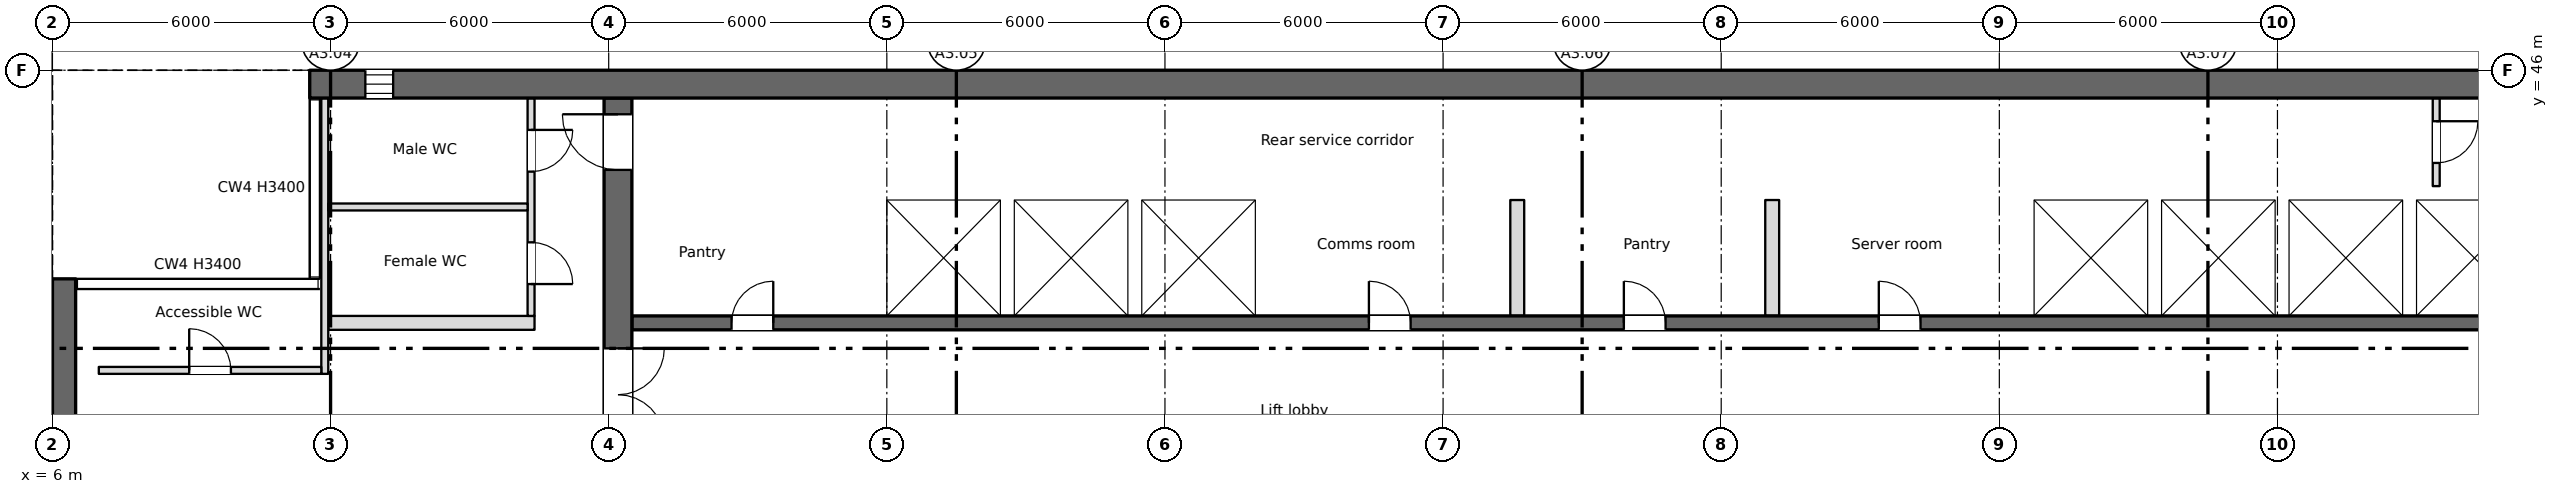
"""IFC4 building model, lengths in metres.
Left out: names, types, materials, properties, quantities, classifications, styles, units other than length and angle.
Written with IfcOpenShell. Run it as: python <this file> out.ifc"""

import sys

from ifc_helpers import new_model, si_unit, direction, frame, frame_2d, origin, place, context, subcontext, project, spatial, rectangle, extrude, element, fill, save


model = new_model("IFC4")
c1 = context("Model", 3, precision=1e-05, world=origin(), true_north=direction((0.0, 1.0)))
c2 = subcontext(c1, "Body", "Model", "MODEL_VIEW")
j1 = project(units=[si_unit("LENGTHUNIT", "METRE"), si_unit("PLANEANGLEUNIT", "RADIAN")], contexts=[c1])
p1 = place(None, origin())
s1 = spatial("IfcSite", under=j1, at=p1, CompositionType="ELEMENT")
p2 = place(p1, origin())
s2 = spatial("IfcBuilding", under=s1, at=p2, CompositionType="ELEMENT")
p3 = place(p2, frame((0.0, 0.0, 239.35)))
s3 = spatial("IfcBuildingStorey", under=s2, at=p3, CompositionType="ELEMENT", Elevation=239.35)
p4 = place(p3, frame((6.25, 8.5, 0.0), z_axis=(0.0, 0.0, 1.0), x_axis=(0.0, 1.0, 0.0)))
e1 = element("IfcWall", 1, at=p4, inside=s3, PredefinedType="SHEAR", context=c2, shape_type="SweptSolid", body=[
    extrude(rectangle(XDim=33.0, YDim=0.5, at=frame_2d((16.5, 0.0))), origin(), (0.0, 0.0, 1.0), 3.4),
])
p5 = place(p4, frame((1.6, 0.0, 0.6)))
e2 = element("IfcOpeningElement", 2, at=p5, cuts=e1, PredefinedType="OPENING", context=c2, shape_type="SweptSolid", body=[
    extrude(rectangle(XDim=0.6, YDim=2.4, at=frame_2d((0.3, 1.2))), frame((0.0, 0.26, 0.0), z_axis=(0.0, -1.0, 0.0), x_axis=(1.0, 0.0, 0.0)), (0.0, 0.0, 1.0), 0.52),
])
p6 = place(p4, frame((7.55, 0.0, 0.6)))
e3 = element("IfcOpeningElement", 3, at=p6, cuts=e1, PredefinedType="OPENING", context=c2, shape_type="SweptSolid", body=[
    extrude(rectangle(XDim=0.6, YDim=2.4, at=frame_2d((0.3, 1.2))), frame((0.0, 0.26, 0.0), z_axis=(0.0, -1.0, 0.0), x_axis=(1.0, 0.0, 0.0)), (0.0, 0.0, 1.0), 0.52),
])
p7 = place(p4, frame((13.2, 0.0, 0.6)))
e4 = element("IfcOpeningElement", 4, at=p7, cuts=e1, PredefinedType="OPENING", context=c2, shape_type="SweptSolid", body=[
    extrude(rectangle(XDim=0.6, YDim=2.4, at=frame_2d((0.3, 1.2))), frame((0.0, 0.26, 0.0), z_axis=(0.0, -1.0, 0.0), x_axis=(1.0, 0.0, 0.0)), (0.0, 0.0, 1.0), 0.52),
])
p8 = place(p3, frame((11.55, 45.7, 0.0), z_axis=(0.0, 0.0, 1.0), x_axis=(1.0, 0.0, 0.0)))
e5 = element("IfcWall", 5, at=p8, inside=s3, PredefinedType="SHEAR", context=c2, shape_type="SweptSolid", body=[
    extrude(rectangle(XDim=48.9, YDim=0.6, at=frame_2d((24.45, 0.0))), origin(), (0.0, 0.0, 1.0), 3.4),
])
p9 = place(p8, frame((1.2, 0.0, 0.6)))
e6 = element("IfcOpeningElement", 6, at=p9, cuts=e5, PredefinedType="OPENING", context=c2, shape_type="SweptSolid", body=[
    extrude(rectangle(XDim=0.6, YDim=2.4, at=frame_2d((0.3, 1.2))), frame((0.0, 0.31, 0.0), z_axis=(0.0, -1.0, 0.0), x_axis=(1.0, 0.0, 0.0)), (0.0, 0.0, 1.0), 0.62),
])
p10 = place(p3, frame((6.75, 28.4, 0.0), z_axis=(0.0, 0.0, 1.0), x_axis=(0.0, 1.0, 0.0)))
e7 = element("IfcWall", 7, at=p10, inside=s3, PredefinedType="SHEAR", context=c2, shape_type="SweptSolid", body=[
    extrude(rectangle(XDim=12.85, YDim=0.5, at=frame_2d((6.425, 0.0))), origin(), (0.0, 0.0, 1.0), 3.4),
])
p11 = place(p3, frame((18.2, 28.4, 0.0), z_axis=(0.0, 0.0, 1.0), x_axis=(0.0, 1.0, 0.0)))
e8 = element("IfcWall", 8, at=p11, inside=s3, PredefinedType="SHEAR", context=c2, shape_type="SweptSolid", body=[
    extrude(rectangle(XDim=17.0, YDim=0.6, at=frame_2d((8.5, 0.0))), origin(), (0.0, 0.0, 1.0), 3.4),
])
p12 = place(p11, frame((9.6, 0.0, 0.0)))
e9 = element("IfcOpeningElement", 9, at=p12, cuts=e8, PredefinedType="OPENING", context=c2, shape_type="SweptSolid", body=[
    extrude(rectangle(XDim=2.0, YDim=2.1, at=frame_2d((1.0, 1.05))), frame((0.0, 0.31, 0.0), z_axis=(0.0, -1.0, 0.0), x_axis=(1.0, 0.0, 0.0)), (0.0, 0.0, 1.0), 0.62),
])
p13 = place(p11, frame((15.45, 0.0, 0.0)))
e10 = element("IfcOpeningElement", 10, at=p13, cuts=e8, PredefinedType="OPENING", context=c2, shape_type="SweptSolid", body=[
    extrude(rectangle(XDim=1.2, YDim=2.1, at=frame_2d((0.6, 1.05))), frame((0.0, 0.31, 0.0), z_axis=(0.0, -1.0, 0.0), x_axis=(1.0, 0.0, 0.0)), (0.0, 0.0, 1.0), 0.62),
])
p14 = place(p3, frame((18.5, 40.55, 0.0), z_axis=(0.0, 0.0, 1.0), x_axis=(1.0, 0.0, 0.0)))
e11 = element("IfcWall", 11, at=p14, inside=s3, PredefinedType="SHEAR", context=c2, shape_type="SweptSolid", body=[
    extrude(rectangle(XDim=41.0, YDim=0.3, at=frame_2d((20.5, 0.0))), origin(), (0.0, 0.0, 1.0), 3.4),
])
p15 = place(p14, frame((2.15, 0.0, 0.0)))
e12 = element("IfcOpeningElement", 12, at=p15, cuts=e11, PredefinedType="OPENING", context=c2, shape_type="SweptSolid", body=[
    extrude(rectangle(XDim=0.9, YDim=2.1, at=frame_2d((0.45, 1.05))), frame((0.0, 0.16, 0.0), z_axis=(0.0, -1.0, 0.0), x_axis=(1.0, 0.0, 0.0)), (0.0, 0.0, 1.0), 0.32),
])
p16 = place(p14, frame((15.9, 0.0, 0.0)))
e13 = element("IfcOpeningElement", 13, at=p16, cuts=e11, PredefinedType="OPENING", context=c2, shape_type="SweptSolid", body=[
    extrude(rectangle(XDim=0.9, YDim=2.1, at=frame_2d((0.45, 1.05))), frame((0.0, 0.16, 0.0), z_axis=(0.0, -1.0, 0.0), x_axis=(1.0, 0.0, 0.0)), (0.0, 0.0, 1.0), 0.32),
])
p17 = place(p14, frame((21.4, 0.0, 0.0)))
e14 = element("IfcOpeningElement", 14, at=p17, cuts=e11, PredefinedType="OPENING", context=c2, shape_type="SweptSolid", body=[
    extrude(rectangle(XDim=0.9, YDim=2.1, at=frame_2d((0.45, 1.05))), frame((0.0, 0.16, 0.0), z_axis=(0.0, -1.0, 0.0), x_axis=(1.0, 0.0, 0.0)), (0.0, 0.0, 1.0), 0.32),
])
p18 = place(p14, frame((26.9, 0.0, 0.0)))
e15 = element("IfcOpeningElement", 15, at=p18, cuts=e11, PredefinedType="OPENING", context=c2, shape_type="SweptSolid", body=[
    extrude(rectangle(XDim=0.9, YDim=2.1, at=frame_2d((0.45, 1.05))), frame((0.0, 0.16, 0.0), z_axis=(0.0, -1.0, 0.0), x_axis=(1.0, 0.0, 0.0)), (0.0, 0.0, 1.0), 0.32),
])
p19 = place(p14, frame((6.175, 0.0, 0.0)))
e16 = element("IfcOpeningElement", 16, at=p19, cuts=e11, PredefinedType="OPENING", context=c2, shape_type="SweptSolid", body=[
    extrude(rectangle(XDim=1.1, YDim=2.1, at=frame_2d((0.55, 1.05))), frame((0.0, 0.16, 0.0), z_axis=(0.0, -1.0, 0.0), x_axis=(1.0, 0.0, 0.0)), (0.0, 0.0, 1.0), 0.32),
])
p20 = place(p14, frame((8.925, 0.0, 0.0)))
e17 = element("IfcOpeningElement", 17, at=p20, cuts=e11, PredefinedType="OPENING", context=c2, shape_type="SweptSolid", body=[
    extrude(rectangle(XDim=1.1, YDim=2.1, at=frame_2d((0.55, 1.05))), frame((0.0, 0.16, 0.0), z_axis=(0.0, -1.0, 0.0), x_axis=(1.0, 0.0, 0.0)), (0.0, 0.0, 1.0), 0.32),
])
p21 = place(p14, frame((11.675, 0.0, 0.0)))
e18 = element("IfcOpeningElement", 18, at=p21, cuts=e11, PredefinedType="OPENING", context=c2, shape_type="SweptSolid", body=[
    extrude(rectangle(XDim=1.1, YDim=2.1, at=frame_2d((0.55, 1.05))), frame((0.0, 0.16, 0.0), z_axis=(0.0, -1.0, 0.0), x_axis=(1.0, 0.0, 0.0)), (0.0, 0.0, 1.0), 0.32),
])
p22 = place(p14, frame((30.925, 0.0, 0.0)))
e19 = element("IfcOpeningElement", 19, at=p22, cuts=e11, PredefinedType="OPENING", context=c2, shape_type="SweptSolid", body=[
    extrude(rectangle(XDim=1.1, YDim=2.1, at=frame_2d((0.55, 1.05))), frame((0.0, 0.16, 0.0), z_axis=(0.0, -1.0, 0.0), x_axis=(1.0, 0.0, 0.0)), (0.0, 0.0, 1.0), 0.32),
])
p23 = place(p14, frame((33.675, 0.0, 0.0)))
e20 = element("IfcOpeningElement", 20, at=p23, cuts=e11, PredefinedType="OPENING", context=c2, shape_type="SweptSolid", body=[
    extrude(rectangle(XDim=1.1, YDim=2.1, at=frame_2d((0.55, 1.05))), frame((0.0, 0.16, 0.0), z_axis=(0.0, -1.0, 0.0), x_axis=(1.0, 0.0, 0.0)), (0.0, 0.0, 1.0), 0.32),
])
p24 = place(p14, frame((36.375, 0.0, 0.0)))
e21 = element("IfcOpeningElement", 21, at=p24, cuts=e11, PredefinedType="OPENING", context=c2, shape_type="SweptSolid", body=[
    extrude(rectangle(XDim=1.2, YDim=2.1, at=frame_2d((0.6, 1.05))), frame((0.0, 0.16, 0.0), z_axis=(0.0, -1.0, 0.0), x_axis=(1.0, 0.0, 0.0)), (0.0, 0.0, 1.0), 0.32),
])
p25 = place(p14, frame((39.15, 0.0, 0.0)))
e22 = element("IfcOpeningElement", 22, at=p25, cuts=e11, PredefinedType="OPENING", context=c2, shape_type="SweptSolid", body=[
    extrude(rectangle(XDim=1.2, YDim=2.1, at=frame_2d((0.6, 1.05))), frame((0.0, 0.16, 0.0), z_axis=(0.0, -1.0, 0.0), x_axis=(1.0, 0.0, 0.0)), (0.0, 0.0, 1.0), 0.32),
])
p26 = place(p3, frame((18.5, 43.35, 0.0), z_axis=(0.0, 0.0, 1.0), x_axis=(1.0, 0.0, 0.0)))
e23 = element("IfcWall", 23, at=p26, inside=s3, PredefinedType="SHEAR", context=c2, shape_type="SweptSolid", body=[
    extrude(rectangle(XDim=41.0, YDim=0.3, at=frame_2d((20.5, 0.0))), origin(), (0.0, 0.0, 1.0), 3.4),
])
p27 = place(p3, frame((11.95, 40.55, 0.0), z_axis=(0.0, 0.0, 1.0), x_axis=(1.0, 0.0, 0.0)))
e24 = element("IfcWall", 24, at=p27, inside=s3, PredefinedType="PARTITIONING", context=c2, shape_type="SweptSolid", body=[
    extrude(rectangle(XDim=4.45, YDim=0.3, at=frame_2d((2.225, 0.0))), origin(), (0.0, 0.0, 1.0), 3.4),
])
for number, where, z_axis, x_axis in (
    (25, (23.85, 40.7, 0.0), (0.0, 0.0, 1.0), (0.0, 1.0, 0.0)),
    (26, (26.6, 40.7, 0.0), (0.0, 0.0, 1.0), (0.0, 1.0, 0.0)),
    (27, (29.35, 40.7, 0.0), (0.0, 0.0, 1.0), (0.0, 1.0, 0.0)),
    (28, (32.1, 40.7, 0.0), (0.0, 0.0, 1.0), (0.0, 1.0, 0.0)),
    (29, (48.6, 40.7, 0.0), (0.0, 0.0, 1.0), (0.0, 1.0, 0.0)),
    (30, (51.35, 40.7, 0.0), (0.0, 0.0, 1.0), (0.0, 1.0, 0.0)),
    (31, (54.1, 40.7, 0.0), (0.0, 0.0, 1.0), (0.0, 1.0, 0.0)),
    (32, (56.85, 40.7, 0.0), (0.0, 0.0, 1.0), (0.0, 1.0, 0.0)),
):
    element("IfcWall", number, at=place(p3, frame(where, z_axis=z_axis, x_axis=x_axis)), inside=s3, PredefinedType="SHEAR", context=c2, shape_type="SweptSolid", body=[
        extrude(rectangle(XDim=2.5, YDim=0.3, at=frame_2d((1.25, 0.0))), origin(), (0.0, 0.0, 1.0), 3.4),
    ])
p28 = place(p3, frame((16.325, 45.4, 0.0), z_axis=(0.0, 0.0, 1.0), x_axis=(0.0, -1.0, 0.0)))
e33 = element("IfcWall", 33, at=p28, inside=s3, PredefinedType="PARTITIONING", context=c2, shape_type="SweptSolid", body=[
    extrude(rectangle(XDim=4.7, YDim=0.15, at=frame_2d((2.35, 0.0))), origin(), (0.0, 0.0, 1.0), 3.4),
])
p29 = place(p28, frame((3.113, 0.0, 0.0)))
e34 = element("IfcOpeningElement", 34, at=p29, cuts=e33, PredefinedType="OPENING", context=c2, shape_type="SweptSolid", body=[
    extrude(rectangle(XDim=0.9, YDim=2.1, at=frame_2d((0.45, 1.05))), frame((0.0, 0.085, 0.0), z_axis=(0.0, -1.0, 0.0), x_axis=(1.0, 0.0, 0.0)), (0.0, 0.0, 1.0), 0.17),
])
p30 = place(p28, frame((0.688, 0.0, 0.0)))
e35 = element("IfcOpeningElement", 35, at=p30, cuts=e33, PredefinedType="OPENING", context=c2, shape_type="SweptSolid", body=[
    extrude(rectangle(XDim=0.9, YDim=2.1, at=frame_2d((0.45, 1.05))), frame((0.0, 0.085, 0.0), z_axis=(0.0, -1.0, 0.0), x_axis=(1.0, 0.0, 0.0)), (0.0, 0.0, 1.0), 0.17),
])
p31 = place(p3, frame((11.875, 39.45, 0.0), z_axis=(0.0, 0.0, 1.0), x_axis=(0.0, 1.0, 0.0)))
e36 = element("IfcWall", 36, at=p31, inside=s3, PredefinedType="PARTITIONING", context=c2, shape_type="SweptSolid", body=[
    extrude(rectangle(XDim=5.95, YDim=0.15, at=frame_2d((2.975, 0.0))), origin(), (0.0, 0.0, 1.0), 3.4),
])
p32 = place(p3, frame((7.0, 39.525, 0.0), z_axis=(0.0, 0.0, 1.0), x_axis=(1.0, 0.0, 0.0)))
e37 = element("IfcWall", 37, at=p32, inside=s3, PredefinedType="PARTITIONING", context=c2, shape_type="SweptSolid", body=[
    extrude(rectangle(XDim=4.8, YDim=0.15, at=frame_2d((2.4, 0.0))), origin(), (0.0, 0.0, 1.0), 3.4),
])
p33 = place(p32, frame((1.95, 0.0, 0.0)))
e38 = element("IfcOpeningElement", 38, at=p33, cuts=e37, PredefinedType="OPENING", context=c2, shape_type="SweptSolid", body=[
    extrude(rectangle(XDim=0.9, YDim=2.1, at=frame_2d((0.45, 1.05))), frame((0.0, 0.085, 0.0), z_axis=(0.0, -1.0, 0.0), x_axis=(1.0, 0.0, 0.0)), (0.0, 0.0, 1.0), 0.17),
])
p34 = place(p3, frame((11.95, 43.05, 0.0), z_axis=(0.0, 0.0, 1.0), x_axis=(1.0, 0.0, 0.0)))
e39 = element("IfcWall", 39, at=p34, inside=s3, PredefinedType="PARTITIONING", context=c2, shape_type="SweptSolid", body=[
    extrude(rectangle(XDim=4.3, YDim=0.15, at=frame_2d((2.15, 0.0))), origin(), (0.0, 0.0, 1.0), 3.4),
])
p35 = place(p3, frame((57.425, 45.4, 0.0), z_axis=(0.0, 0.0, 1.0), x_axis=(0.0, -1.0, 0.0)))
e40 = element("IfcWall", 40, at=p35, inside=s3, PredefinedType="PARTITIONING", context=c2, shape_type="SweptSolid", body=[
    extrude(rectangle(XDim=1.9, YDim=0.15, at=frame_2d((0.95, 0.0))), origin(), (0.0, 0.0, 1.0), 3.4),
])
p36 = place(p35, frame((0.5, 0.0, 0.0)))
e41 = element("IfcOpeningElement", 41, at=p36, cuts=e40, PredefinedType="OPENING", context=c2, shape_type="SweptSolid", body=[
    extrude(rectangle(XDim=0.9, YDim=2.1, at=frame_2d((0.45, 1.05))), frame((0.0, 0.085, 0.0), z_axis=(0.0, -1.0, 0.0), x_axis=(1.0, 0.0, 0.0)), (0.0, 0.0, 1.0), 0.17),
])
for number, where, z_axis, x_axis in (
    (42, (37.6, 40.7, 0.0), (0.0, 0.0, 1.0), (0.0, 1.0, 0.0)),
    (43, (43.1, 40.7, 0.0), (0.0, 0.0, 1.0), (0.0, 1.0, 0.0)),
):
    element("IfcWall", number, at=place(p3, frame(where, z_axis=z_axis, x_axis=x_axis)), inside=s3, PredefinedType="PARTITIONING", context=c2, shape_type="SweptSolid", body=[
        extrude(rectangle(XDim=2.5, YDim=0.3, at=frame_2d((1.25, 0.0))), origin(), (0.0, 0.0, 1.0), 3.4),
    ])
p37 = place(p9, origin())
e44 = element("IfcWindow", 44, at=p37, inside=s3, PartitioningType="SINGLE_PANEL", PredefinedType="WINDOW", context=c2, shape_type="SweptSolid", body=[
    extrude(rectangle(XDim=0.6, YDim=2.4, at=frame_2d((0.3, 1.2))), frame((0.0, 0.03, 0.0), z_axis=(0.0, -1.0, 0.0), x_axis=(1.0, 0.0, 0.0)), (0.0, 0.0, 1.0), 0.06),
])
fill(e6, e44)
p38 = place(p33, origin())
e45 = element("IfcDoor", 45, at=p38, inside=s3, OperationType="SINGLE_SWING_LEFT", PredefinedType="DOOR", context=c2, shape_type="SweptSolid", body=[
    extrude(rectangle(XDim=0.9, YDim=2.1, at=frame_2d((0.45, 1.05))), frame((0.0, 0.025, 0.0), z_axis=(0.0, -1.0, 0.0), x_axis=(1.0, 0.0, 0.0)), (0.0, 0.0, 1.0), 0.05),
])
fill(e38, e45)
p39 = place(p29, origin())
e46 = element("IfcDoor", 46, at=p39, inside=s3, OperationType="SINGLE_SWING_RIGHT", PredefinedType="DOOR", context=c2, shape_type="SweptSolid", body=[
    extrude(rectangle(XDim=0.9, YDim=2.1, at=frame_2d((0.45, 1.05))), frame((0.0, 0.025, 0.0), z_axis=(0.0, -1.0, 0.0), x_axis=(1.0, 0.0, 0.0)), (0.0, 0.0, 1.0), 0.05),
])
fill(e34, e46)
p40 = place(p30, origin())
e47 = element("IfcDoor", 47, at=p40, inside=s3, OperationType="SINGLE_SWING_LEFT", PredefinedType="DOOR", context=c2, shape_type="SweptSolid", body=[
    extrude(rectangle(XDim=0.9, YDim=2.1, at=frame_2d((0.45, 1.05))), frame((0.0, 0.025, 0.0), z_axis=(0.0, -1.0, 0.0), x_axis=(1.0, 0.0, 0.0)), (0.0, 0.0, 1.0), 0.05),
])
fill(e35, e47)
p41 = place(p36, origin())
e48 = element("IfcDoor", 48, at=p41, inside=s3, OperationType="SINGLE_SWING_LEFT", PredefinedType="DOOR", context=c2, shape_type="SweptSolid", body=[
    extrude(rectangle(XDim=0.9, YDim=2.1, at=frame_2d((0.45, 1.05))), frame((0.0, 0.025, 0.0), z_axis=(0.0, -1.0, 0.0), x_axis=(1.0, 0.0, 0.0)), (0.0, 0.0, 1.0), 0.05),
])
fill(e41, e48)
p42 = place(p15, origin())
e49 = element("IfcDoor", 49, at=p42, inside=s3, OperationType="SINGLE_SWING_RIGHT", PredefinedType="DOOR", context=c2, shape_type="SweptSolid", body=[
    extrude(rectangle(XDim=0.9, YDim=2.1, at=frame_2d((0.45, 1.05))), frame((0.0, 0.025, 0.0), z_axis=(0.0, -1.0, 0.0), x_axis=(1.0, 0.0, 0.0)), (0.0, 0.0, 1.0), 0.05),
])
fill(e12, e49)
p43 = place(p16, origin())
e50 = element("IfcDoor", 50, at=p43, inside=s3, OperationType="SINGLE_SWING_LEFT", PredefinedType="DOOR", context=c2, shape_type="SweptSolid", body=[
    extrude(rectangle(XDim=0.9, YDim=2.1, at=frame_2d((0.45, 1.05))), frame((0.0, 0.025, 0.0), z_axis=(0.0, -1.0, 0.0), x_axis=(1.0, 0.0, 0.0)), (0.0, 0.0, 1.0), 0.05),
])
fill(e13, e50)
p44 = place(p17, origin())
e51 = element("IfcDoor", 51, at=p44, inside=s3, OperationType="SINGLE_SWING_LEFT", PredefinedType="DOOR", context=c2, shape_type="SweptSolid", body=[
    extrude(rectangle(XDim=0.9, YDim=2.1, at=frame_2d((0.45, 1.05))), frame((0.0, 0.025, 0.0), z_axis=(0.0, -1.0, 0.0), x_axis=(1.0, 0.0, 0.0)), (0.0, 0.0, 1.0), 0.05),
])
fill(e14, e51)
p45 = place(p18, origin())
e52 = element("IfcDoor", 52, at=p45, inside=s3, OperationType="SINGLE_SWING_LEFT", PredefinedType="DOOR", context=c2, shape_type="SweptSolid", body=[
    extrude(rectangle(XDim=0.9, YDim=2.1, at=frame_2d((0.45, 1.05))), frame((0.0, 0.025, 0.0), z_axis=(0.0, -1.0, 0.0), x_axis=(1.0, 0.0, 0.0)), (0.0, 0.0, 1.0), 0.05),
])
fill(e15, e52)
p46 = place(p19, origin())
e53 = element("IfcDoor", 53, at=p46, inside=s3, OperationType="SLIDING_TO_LEFT", PredefinedType="DOOR", context=c2, shape_type="SweptSolid", body=[
    extrude(rectangle(XDim=1.1, YDim=2.1, at=frame_2d((0.55, 1.05))), frame((0.0, 0.025, 0.0), z_axis=(0.0, -1.0, 0.0), x_axis=(1.0, 0.0, 0.0)), (0.0, 0.0, 1.0), 0.05),
])
fill(e16, e53)
p47 = place(p20, origin())
e54 = element("IfcDoor", 54, at=p47, inside=s3, OperationType="SLIDING_TO_LEFT", PredefinedType="DOOR", context=c2, shape_type="SweptSolid", body=[
    extrude(rectangle(XDim=1.1, YDim=2.1, at=frame_2d((0.55, 1.05))), frame((0.0, 0.025, 0.0), z_axis=(0.0, -1.0, 0.0), x_axis=(1.0, 0.0, 0.0)), (0.0, 0.0, 1.0), 0.05),
])
fill(e17, e54)
p48 = place(p21, origin())
e55 = element("IfcDoor", 55, at=p48, inside=s3, OperationType="SLIDING_TO_LEFT", PredefinedType="DOOR", context=c2, shape_type="SweptSolid", body=[
    extrude(rectangle(XDim=1.1, YDim=2.1, at=frame_2d((0.55, 1.05))), frame((0.0, 0.025, 0.0), z_axis=(0.0, -1.0, 0.0), x_axis=(1.0, 0.0, 0.0)), (0.0, 0.0, 1.0), 0.05),
])
fill(e18, e55)
p49 = place(p22, origin())
e56 = element("IfcDoor", 56, at=p49, inside=s3, OperationType="SLIDING_TO_LEFT", PredefinedType="DOOR", context=c2, shape_type="SweptSolid", body=[
    extrude(rectangle(XDim=1.1, YDim=2.1, at=frame_2d((0.55, 1.05))), frame((0.0, 0.025, 0.0), z_axis=(0.0, -1.0, 0.0), x_axis=(1.0, 0.0, 0.0)), (0.0, 0.0, 1.0), 0.05),
])
fill(e19, e56)
p50 = place(p23, origin())
e57 = element("IfcDoor", 57, at=p50, inside=s3, OperationType="SLIDING_TO_LEFT", PredefinedType="DOOR", context=c2, shape_type="SweptSolid", body=[
    extrude(rectangle(XDim=1.1, YDim=2.1, at=frame_2d((0.55, 1.05))), frame((0.0, 0.025, 0.0), z_axis=(0.0, -1.0, 0.0), x_axis=(1.0, 0.0, 0.0)), (0.0, 0.0, 1.0), 0.05),
])
fill(e20, e57)
p51 = place(p24, origin())
e58 = element("IfcDoor", 58, at=p51, inside=s3, OperationType="SLIDING_TO_LEFT", PredefinedType="DOOR", context=c2, shape_type="SweptSolid", body=[
    extrude(rectangle(XDim=1.2, YDim=2.1, at=frame_2d((0.6, 1.05))), frame((0.0, 0.025, 0.0), z_axis=(0.0, -1.0, 0.0), x_axis=(1.0, 0.0, 0.0)), (0.0, 0.0, 1.0), 0.05),
])
fill(e21, e58)
p52 = place(p25, origin())
e59 = element("IfcDoor", 59, at=p52, inside=s3, OperationType="SLIDING_TO_LEFT", PredefinedType="DOOR", context=c2, shape_type="SweptSolid", body=[
    extrude(rectangle(XDim=1.2, YDim=2.1, at=frame_2d((0.6, 1.05))), frame((0.0, 0.025, 0.0), z_axis=(0.0, -1.0, 0.0), x_axis=(1.0, 0.0, 0.0)), (0.0, 0.0, 1.0), 0.05),
])
fill(e22, e59)
p53 = place(p12, origin())
e60 = element("IfcDoor", 60, at=p53, inside=s3, OperationType="DOUBLE_DOOR_SINGLE_SWING", PredefinedType="DOOR", context=c2, shape_type="SweptSolid", body=[
    extrude(rectangle(XDim=2.0, YDim=2.1, at=frame_2d((1.0, 1.05))), frame((0.0, 0.025, 0.0), z_axis=(0.0, -1.0, 0.0), x_axis=(1.0, 0.0, 0.0)), (0.0, 0.0, 1.0), 0.05),
])
fill(e9, e60)
p54 = place(p13, origin())
e61 = element("IfcDoor", 61, at=p54, inside=s3, OperationType="SINGLE_SWING_RIGHT", PredefinedType="DOOR", context=c2, shape_type="SweptSolid", body=[
    extrude(rectangle(XDim=1.2, YDim=2.1, at=frame_2d((0.6, 1.05))), frame((0.0, 0.025, 0.0), z_axis=(0.0, -1.0, 0.0), x_axis=(1.0, 0.0, 0.0)), (0.0, 0.0, 1.0), 0.05),
])
fill(e10, e61)
save(model, sys.argv[1])
